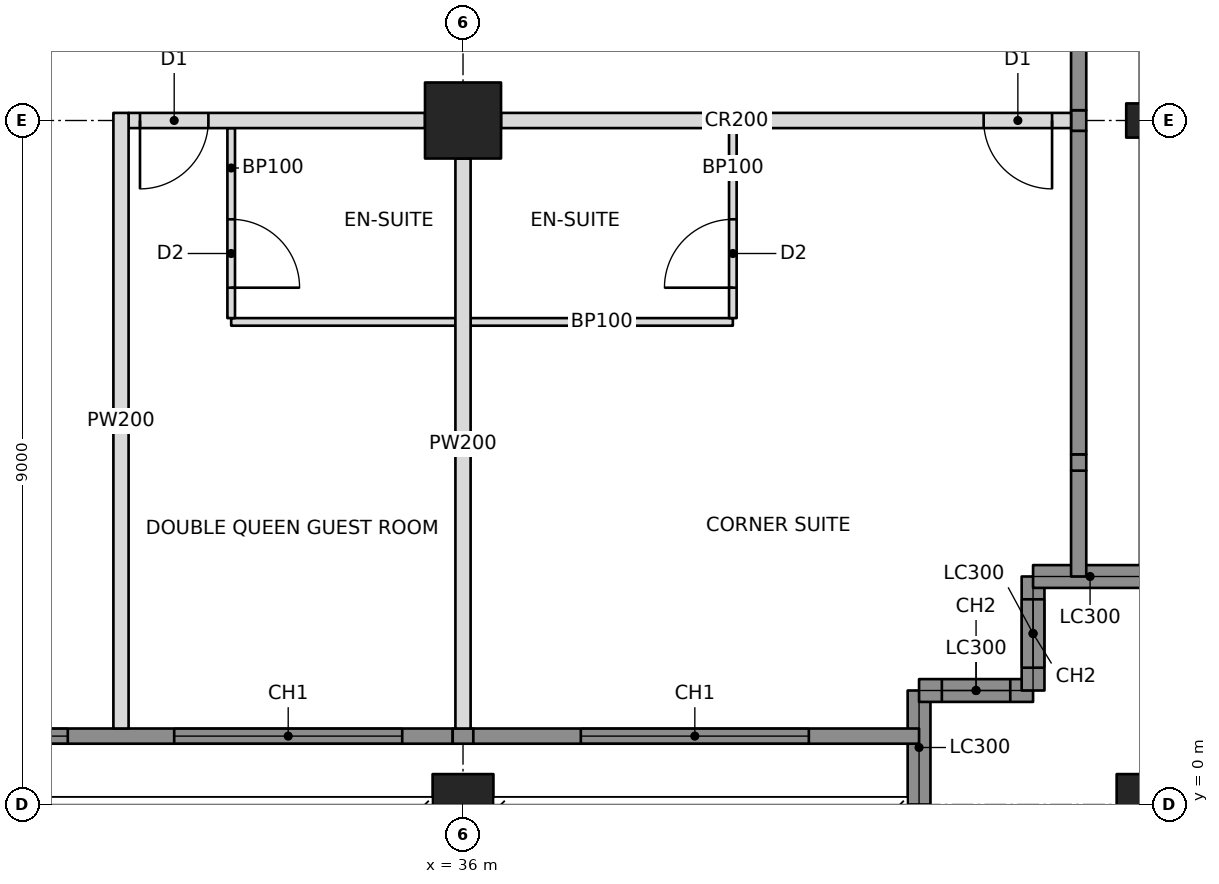
"""IFC4 building model, lengths in metres.
Left out: names, types, materials, properties, quantities, classifications, styles, units other than length and angle.
Written with IfcOpenShell. Run it as: python <this file> out.ifc"""

import sys

from ifc_helpers import new_model, si_unit, direction, frame, frame_2d, origin, origin_2d, place, context, subcontext, project, spatial, rectangle, hollow_rectangle, i_section, extrude, element, fill, save


model = new_model("IFC4")
c1 = context("Model", 3, precision=1e-05, world=origin(), true_north=direction((0.0, 1.0)))
c2 = subcontext(c1, "Body", "Model", "MODEL_VIEW")
j1 = project(units=[si_unit("LENGTHUNIT", "METRE"), si_unit("PLANEANGLEUNIT", "RADIAN")], contexts=[c1])
p1 = place(None, origin())
s1 = spatial("IfcSite", under=j1, at=p1, CompositionType="ELEMENT")
p2 = place(p1, origin())
s2 = spatial("IfcBuilding", under=s1, at=p2, CompositionType="ELEMENT")
p3 = place(p2, frame((0.0, 0.0, 97.6)))
s3 = spatial("IfcBuildingStorey", under=s2, at=p3, CompositionType="ELEMENT", Elevation=97.6)
p4 = place(p3, frame((36.0, 0.0, 0.0), z_axis=(0.0, 0.0, 1.0), x_axis=(1.0, 0.0, 0.0)))
e1 = element("IfcColumn", 1, at=p4, inside=s3, PredefinedType="COLUMN", context=c2, shape_type="SweptSolid", body=[
    extrude(hollow_rectangle(XDim=0.8, YDim=0.8, WallThickness=0.07, at=origin_2d()), origin(), (0.0, 0.0, 1.0), 3.4),
])
p5 = place(p3, frame((36.0, 9.0, 0.0), z_axis=(0.0, 0.0, 1.0), x_axis=(0.0, 1.0, 0.0)))
e2 = element("IfcColumn", 2, at=p5, inside=s3, PredefinedType="COLUMN", context=c2, shape_type="SweptSolid", body=[
    extrude(hollow_rectangle(XDim=1.0, YDim=1.0, WallThickness=0.1, at=origin_2d()), origin(), (0.0, 0.0, 1.0), 3.4),
])
p6 = place(p3, frame((45.0, 0.0, 0.0), z_axis=(0.0, 0.0, 1.0), x_axis=(1.0, 0.0, 0.0)))
e3 = element("IfcColumn", 3, at=p6, inside=s3, PredefinedType="COLUMN", context=c2, shape_type="SweptSolid", body=[
    extrude(hollow_rectangle(XDim=0.8, YDim=0.8, WallThickness=0.07, at=origin_2d()), origin(), (0.0, 0.0, 1.0), 3.4),
])
p7 = place(p3, frame((45.0, 9.0, 0.0), z_axis=(0.0, 0.0, 1.0), x_axis=(0.0, 1.0, 0.0)))
e4 = element("IfcColumn", 4, at=p7, inside=s3, PredefinedType="COLUMN", context=c2, shape_type="SweptSolid", body=[
    extrude(i_section(OverallWidth=0.449, OverallDepth=0.549, WebThickness=0.072, FlangeThickness=0.115, at=origin_2d()), origin(), (0.0, 0.0, 1.0), 3.4),
])
p8 = place(p3, frame((42.0, 0.0, 0.0), z_axis=(0.0, 0.0, 1.0), x_axis=(0.0, 1.0, 0.0)))
e5 = element("IfcWall", 5, at=p8, inside=s3, PredefinedType="SOLIDWALL", context=c2, shape_type="SweptSolid", body=[
    extrude(rectangle(XDim=1.5, YDim=0.3, at=frame_2d((0.75, 0.0))), origin(), (0.0, 0.0, 1.0), 2.42),
])
p9 = place(p3, frame((42.0, 1.5, 0.0), z_axis=(0.0, 0.0, 1.0), x_axis=(1.0, 0.0, 0.0)))
e6 = element("IfcWall", 6, at=p9, inside=s3, PredefinedType="SOLIDWALL", context=c2, shape_type="SweptSolid", body=[
    extrude(rectangle(XDim=1.5, YDim=0.3, at=frame_2d((0.75, 0.0))), origin(), (0.0, 0.0, 1.0), 3.2),
])
p10 = place(p9, frame((0.3, 0.0, 0.6)))
e7 = element("IfcOpeningElement", 7, at=p10, cuts=e6, PredefinedType="OPENING", context=c2, shape_type="SweptSolid", body=[
    extrude(rectangle(XDim=0.9, YDim=2.2, at=frame_2d((0.45, 1.1))), frame((0.0, 0.16, 0.0), z_axis=(0.0, -1.0, 0.0), x_axis=(1.0, 0.0, 0.0)), (0.0, 0.0, 1.0), 0.32),
])
p11 = place(p3, frame((43.5, 1.5, 0.0), z_axis=(0.0, 0.0, 1.0), x_axis=(0.0, 1.0, 0.0)))
e8 = element("IfcWall", 8, at=p11, inside=s3, PredefinedType="SOLIDWALL", context=c2, shape_type="SweptSolid", body=[
    extrude(rectangle(XDim=1.5, YDim=0.3, at=frame_2d((0.75, 0.0))), origin(), (0.0, 0.0, 1.0), 3.2),
])
p12 = place(p11, frame((0.3, 0.0, 0.6)))
e9 = element("IfcOpeningElement", 9, at=p12, cuts=e8, PredefinedType="OPENING", context=c2, shape_type="SweptSolid", body=[
    extrude(rectangle(XDim=0.9, YDim=2.2, at=frame_2d((0.45, 1.1))), frame((0.0, 0.16, 0.0), z_axis=(0.0, -1.0, 0.0), x_axis=(1.0, 0.0, 0.0)), (0.0, 0.0, 1.0), 0.32),
])
p13 = place(p3, frame((43.5, 3.0, 0.0), z_axis=(0.0, 0.0, 1.0), x_axis=(1.0, 0.0, 0.0)))
e10 = element("IfcWall", 10, at=p13, inside=s3, PredefinedType="SOLIDWALL", context=c2, shape_type="SweptSolid", body=[
    extrude(rectangle(XDim=1.5, YDim=0.3, at=frame_2d((0.75, 0.0))), origin(), (0.0, 0.0, 1.0), 2.42),
])
p14 = place(p3, frame((44.1, 3.0, 0.0), z_axis=(0.0, 0.0, 1.0), x_axis=(0.0, 1.0, 0.0)))
e11 = element("IfcWall", 11, at=p14, inside=s3, PredefinedType="SOLIDWALL", context=c2, shape_type="SweptSolid", body=[
    extrude(rectangle(XDim=1.393, YDim=0.2, at=frame_2d((0.696, 0.0))), origin(), (0.0, 0.0, 1.0), 3.2),
])
p15 = place(p3, frame((31.6, 9.0, 0.0), z_axis=(0.0, 0.0, 1.0), x_axis=(1.0, 0.0, 0.0)))
e12 = element("IfcWall", 12, at=p15, inside=s3, PredefinedType="PARTITIONING", context=c2, shape_type="SweptSolid", body=[
    extrude(rectangle(XDim=3.9, YDim=0.2, at=frame_2d((1.95, 0.0))), origin(), (0.0, 0.0, 1.0), 2.405),
])
p16 = place(p15, frame((0.15, 0.0, 0.0)))
e13 = element("IfcOpeningElement", 13, at=p16, cuts=e12, PredefinedType="OPENING", context=c2, shape_type="SweptSolid", body=[
    extrude(rectangle(XDim=0.9, YDim=2.1, at=frame_2d((0.45, 1.05))), frame((0.0, 0.11, 0.0), z_axis=(0.0, -1.0, 0.0), x_axis=(1.0, 0.0, 0.0)), (0.0, 0.0, 1.0), 0.22),
])
p17 = place(p3, frame((36.5, 9.0, 0.0), z_axis=(0.0, 0.0, 1.0), x_axis=(1.0, 0.0, 0.0)))
e14 = element("IfcWall", 14, at=p17, inside=s3, PredefinedType="PARTITIONING", context=c2, shape_type="SweptSolid", body=[
    extrude(rectangle(XDim=7.5, YDim=0.2, at=frame_2d((3.75, 0.0))), origin(), (0.0, 0.0, 1.0), 2.438),
])
p18 = place(p17, frame((6.35, 0.0, 0.0)))
e15 = element("IfcOpeningElement", 15, at=p18, cuts=e14, PredefinedType="OPENING", context=c2, shape_type="SweptSolid", body=[
    extrude(rectangle(XDim=0.9, YDim=2.1, at=frame_2d((0.45, 1.05))), frame((0.0, 0.11, 0.0), z_axis=(0.0, -1.0, 0.0), x_axis=(1.0, 0.0, 0.0)), (0.0, 0.0, 1.0), 0.22),
])
p19 = place(p3, frame((31.5, 9.1, 0.0), z_axis=(0.0, 0.0, 1.0), x_axis=(0.0, -1.0, 0.0)))
e16 = element("IfcWall", 16, at=p19, inside=s3, PredefinedType="PARTITIONING", context=c2, shape_type="SweptSolid", body=[
    extrude(rectangle(XDim=8.1, YDim=0.2, at=frame_2d((4.05, 0.0))), origin(), (0.0, 0.0, 1.0), 2.404),
])
p20 = place(p3, frame((36.0, 8.5, 0.0), z_axis=(0.0, 0.0, 1.0), x_axis=(0.0, -1.0, 0.0)))
e17 = element("IfcWall", 17, at=p20, inside=s3, PredefinedType="PARTITIONING", context=c2, shape_type="SweptSolid", body=[
    extrude(rectangle(XDim=7.5, YDim=0.2, at=frame_2d((3.75, 0.0))), origin(), (0.0, 0.0, 1.0), 2.438),
])
p21 = place(p3, frame((32.95, 6.35, 0.0), z_axis=(0.0, 0.0, 1.0), x_axis=(1.0, 0.0, 0.0)))
e18 = element("IfcWall", 18, at=p21, inside=s3, PredefinedType="PARTITIONING", context=c2, shape_type="SweptSolid", body=[
    extrude(rectangle(XDim=2.95, YDim=0.1, at=frame_2d((1.475, 0.0))), origin(), (0.0, 0.0, 1.0), 2.438),
])
p22 = place(p3, frame((32.95, 8.9, 0.0), z_axis=(0.0, 0.0, 1.0), x_axis=(0.0, -1.0, 0.0)))
e19 = element("IfcWall", 19, at=p22, inside=s3, PredefinedType="PARTITIONING", context=c2, shape_type="SweptSolid", body=[
    extrude(rectangle(XDim=2.5, YDim=0.1, at=frame_2d((1.25, 0.0))), origin(), (0.0, 0.0, 1.0), 2.404),
])
p23 = place(p22, frame((1.2, 0.0, 0.0)))
e20 = element("IfcOpeningElement", 20, at=p23, cuts=e19, PredefinedType="OPENING", context=c2, shape_type="SweptSolid", body=[
    extrude(rectangle(XDim=0.9, YDim=2.1, at=frame_2d((0.45, 1.05))), frame((0.0, 0.06, 0.0), z_axis=(0.0, -1.0, 0.0), x_axis=(1.0, 0.0, 0.0)), (0.0, 0.0, 1.0), 0.12),
])
p24 = place(p3, frame((36.1, 6.35, 0.0), z_axis=(0.0, 0.0, 1.0), x_axis=(1.0, 0.0, 0.0)))
e21 = element("IfcWall", 21, at=p24, inside=s3, PredefinedType="PARTITIONING", context=c2, shape_type="SweptSolid", body=[
    extrude(rectangle(XDim=3.45, YDim=0.1, at=frame_2d((1.725, 0.0))), origin(), (0.0, 0.0, 1.0), 2.438),
])
p25 = place(p3, frame((39.55, 8.9, 0.0), z_axis=(0.0, 0.0, 1.0), x_axis=(0.0, -1.0, 0.0)))
e22 = element("IfcWall", 22, at=p25, inside=s3, PredefinedType="PARTITIONING", context=c2, shape_type="SweptSolid", body=[
    extrude(rectangle(XDim=2.5, YDim=0.1, at=frame_2d((1.25, 0.0))), origin(), (0.0, 0.0, 1.0), 2.438),
])
p26 = place(p25, frame((1.2, 0.0, 0.0)))
e23 = element("IfcOpeningElement", 23, at=p26, cuts=e22, PredefinedType="OPENING", context=c2, shape_type="SweptSolid", body=[
    extrude(rectangle(XDim=0.9, YDim=2.1, at=frame_2d((0.45, 1.05))), frame((0.0, 0.06, 0.0), z_axis=(0.0, -1.0, 0.0), x_axis=(1.0, 0.0, 0.0)), (0.0, 0.0, 1.0), 0.12),
])
p27 = place(p3, frame((27.194, 0.9, 0.0), z_axis=(0.0, 0.0, 1.0), x_axis=(1.0, 0.0, 0.0)))
e24 = element("IfcWall", 24, at=p27, inside=s3, PredefinedType="SOLIDWALL", context=c2, shape_type="SweptSolid", body=[
    extrude(rectangle(XDim=8.671, YDim=0.2, at=frame_2d((4.335, 0.0))), origin(), (0.0, 0.0, 1.0), 3.2),
])
p28 = place(p27, frame((0.606, 0.0, 0.6)))
e25 = element("IfcOpeningElement", 25, at=p28, cuts=e24, PredefinedType="OPENING", context=c2, shape_type="SweptSolid", body=[
    extrude(rectangle(XDim=3.0, YDim=2.2, at=frame_2d((1.5, 1.1))), frame((0.0, 0.11, 0.0), z_axis=(0.0, -1.0, 0.0), x_axis=(1.0, 0.0, 0.0)), (0.0, 0.0, 1.0), 0.22),
])
p29 = place(p27, frame((5.006, 0.0, 0.6)))
e26 = element("IfcOpeningElement", 26, at=p29, cuts=e24, PredefinedType="OPENING", context=c2, shape_type="SweptSolid", body=[
    extrude(rectangle(XDim=3.0, YDim=2.2, at=frame_2d((1.5, 1.1))), frame((0.0, 0.11, 0.0), z_axis=(0.0, -1.0, 0.0), x_axis=(1.0, 0.0, 0.0)), (0.0, 0.0, 1.0), 0.22),
])
p30 = place(p3, frame((35.865, 0.9, 0.0), z_axis=(0.0, 0.0, 1.0), x_axis=(1.0, 0.0, 0.0)))
e27 = element("IfcWall", 27, at=p30, inside=s3, PredefinedType="SOLIDWALL", context=c2, shape_type="SweptSolid", body=[
    extrude(rectangle(XDim=0.271, YDim=0.2, at=frame_2d((0.135, 0.0))), origin(), (0.0, 0.0, 1.0), 2.438),
])
p31 = place(p3, frame((36.135, 0.9, 0.0), z_axis=(0.0, 0.0, 1.0), x_axis=(1.0, 0.0, 0.0)))
e28 = element("IfcWall", 28, at=p31, inside=s3, PredefinedType="SOLIDWALL", context=c2, shape_type="SweptSolid", body=[
    extrude(rectangle(XDim=5.865, YDim=0.2, at=frame_2d((2.932, 0.0))), origin(), (0.0, 0.0, 1.0), 3.2),
])
p32 = place(p31, frame((1.415, 0.0, 0.6)))
e29 = element("IfcOpeningElement", 29, at=p32, cuts=e28, PredefinedType="OPENING", context=c2, shape_type="SweptSolid", body=[
    extrude(rectangle(XDim=3.0, YDim=2.2, at=frame_2d((1.5, 1.1))), frame((0.0, 0.11, 0.0), z_axis=(0.0, -1.0, 0.0), x_axis=(1.0, 0.0, 0.0)), (0.0, 0.0, 1.0), 0.22),
])
p33 = place(p3, frame((44.1, 4.393, 0.0), z_axis=(0.0, 0.0, 1.0), x_axis=(0.0, 1.0, 0.0)))
e30 = element("IfcWall", 30, at=p33, inside=s3, PredefinedType="SOLIDWALL", context=c2, shape_type="SweptSolid", body=[
    extrude(rectangle(XDim=0.215, YDim=0.2, at=frame_2d((0.107, 0.0))), origin(), (0.0, 0.0, 1.0), 2.661),
])
p34 = place(p3, frame((44.1, 4.607, 0.0), z_axis=(0.0, 0.0, 1.0), x_axis=(0.0, 1.0, 0.0)))
e31 = element("IfcWall", 31, at=p34, inside=s3, PredefinedType="SOLIDWALL", context=c2, shape_type="SweptSolid", body=[
    extrude(rectangle(XDim=4.257, YDim=0.2, at=frame_2d((2.129, 0.0))), origin(), (0.0, 0.0, 1.0), 3.2),
])
p35 = place(p3, frame((44.1, 8.865, 0.0), z_axis=(0.0, 0.0, 1.0), x_axis=(0.0, 1.0, 0.0)))
e32 = element("IfcWall", 32, at=p35, inside=s3, PredefinedType="SOLIDWALL", context=c2, shape_type="SweptSolid", body=[
    extrude(rectangle(XDim=0.271, YDim=0.2, at=frame_2d((0.135, 0.0))), origin(), (0.0, 0.0, 1.0), 2.438),
])
p36 = place(p3, frame((44.1, 9.135, 0.0), z_axis=(0.0, 0.0, 1.0), x_axis=(0.0, 1.0, 0.0)))
e33 = element("IfcWall", 33, at=p36, inside=s3, PredefinedType="SOLIDWALL", context=c2, shape_type="SweptSolid", body=[
    extrude(rectangle(XDim=8.671, YDim=0.2, at=frame_2d((4.335, 0.0))), origin(), (0.0, 0.0, 1.0), 3.2),
])
p37 = place(p36, frame((2.015, 0.0, 0.6)))
e34 = element("IfcOpeningElement", 34, at=p37, cuts=e33, PredefinedType="OPENING", context=c2, shape_type="SweptSolid", body=[
    extrude(rectangle(XDim=3.0, YDim=2.2, at=frame_2d((1.5, 1.1))), frame((0.0, 0.11, 0.0), z_axis=(0.0, -1.0, 0.0), x_axis=(1.0, 0.0, 0.0)), (0.0, 0.0, 1.0), 0.22),
])
p38 = place(p36, frame((5.515, 0.0, 0.6)))
e35 = element("IfcOpeningElement", 35, at=p38, cuts=e33, PredefinedType="OPENING", context=c2, shape_type="SweptSolid", body=[
    extrude(rectangle(XDim=3.0, YDim=2.2, at=frame_2d((1.5, 1.1))), frame((0.0, 0.11, 0.0), z_axis=(0.0, -1.0, 0.0), x_axis=(1.0, 0.0, 0.0)), (0.0, 0.0, 1.0), 0.22),
])
p39 = place(p10, origin())
e36 = element("IfcWindow", 36, at=p39, inside=s3, PartitioningType="SINGLE_PANEL", PredefinedType="WINDOW", context=c2, shape_type="SweptSolid", body=[
    extrude(rectangle(XDim=0.9, YDim=2.2, at=frame_2d((0.45, 1.1))), frame((0.0, 0.03, 0.0), z_axis=(0.0, -1.0, 0.0), x_axis=(1.0, 0.0, 0.0)), (0.0, 0.0, 1.0), 0.06),
])
fill(e7, e36)
p40 = place(p12, origin())
e37 = element("IfcWindow", 37, at=p40, inside=s3, PartitioningType="SINGLE_PANEL", PredefinedType="WINDOW", context=c2, shape_type="SweptSolid", body=[
    extrude(rectangle(XDim=0.9, YDim=2.2, at=frame_2d((0.45, 1.1))), frame((0.0, 0.03, 0.0), z_axis=(0.0, -1.0, 0.0), x_axis=(1.0, 0.0, 0.0)), (0.0, 0.0, 1.0), 0.06),
])
fill(e9, e37)
p41 = place(p28, origin())
e38 = element("IfcWindow", 38, at=p41, inside=s3, PartitioningType="TRIPLE_PANEL_VERTICAL", PredefinedType="WINDOW", context=c2, shape_type="SweptSolid", body=[
    extrude(rectangle(XDim=3.0, YDim=2.2, at=frame_2d((1.5, 1.1))), frame((0.0, 0.03, 0.0), z_axis=(0.0, -1.0, 0.0), x_axis=(1.0, 0.0, 0.0)), (0.0, 0.0, 1.0), 0.06),
])
fill(e25, e38)
p42 = place(p29, origin())
e39 = element("IfcWindow", 39, at=p42, inside=s3, PartitioningType="TRIPLE_PANEL_VERTICAL", PredefinedType="WINDOW", context=c2, shape_type="SweptSolid", body=[
    extrude(rectangle(XDim=3.0, YDim=2.2, at=frame_2d((1.5, 1.1))), frame((0.0, 0.03, 0.0), z_axis=(0.0, -1.0, 0.0), x_axis=(1.0, 0.0, 0.0)), (0.0, 0.0, 1.0), 0.06),
])
fill(e26, e39)
p43 = place(p32, origin())
e40 = element("IfcWindow", 40, at=p43, inside=s3, PartitioningType="TRIPLE_PANEL_VERTICAL", PredefinedType="WINDOW", context=c2, shape_type="SweptSolid", body=[
    extrude(rectangle(XDim=3.0, YDim=2.2, at=frame_2d((1.5, 1.1))), frame((0.0, 0.03, 0.0), z_axis=(0.0, -1.0, 0.0), x_axis=(1.0, 0.0, 0.0)), (0.0, 0.0, 1.0), 0.06),
])
fill(e29, e40)
p44 = place(p23, origin())
e41 = element("IfcDoor", 41, at=p44, inside=s3, OperationType="SINGLE_SWING_RIGHT", PredefinedType="DOOR", context=c2, shape_type="SweptSolid", body=[
    extrude(rectangle(XDim=0.9, YDim=2.1, at=frame_2d((0.45, 1.05))), frame((0.0, 0.025, 0.0), z_axis=(0.0, -1.0, 0.0), x_axis=(1.0, 0.0, 0.0)), (0.0, 0.0, 1.0), 0.05),
])
fill(e20, e41)
p45 = place(p16, frame((0.9, 0.0, 0.0), z_axis=(0.0, 0.0, 1.0), x_axis=(-1.0, 0.0, 0.0)))
e42 = element("IfcDoor", 42, at=p45, inside=s3, OperationType="SINGLE_SWING_RIGHT", PredefinedType="DOOR", context=c2, shape_type="SweptSolid", body=[
    extrude(rectangle(XDim=0.9, YDim=2.1, at=frame_2d((0.45, 1.05))), frame((0.0, 0.025, 0.0), z_axis=(0.0, -1.0, 0.0), x_axis=(1.0, 0.0, 0.0)), (0.0, 0.0, 1.0), 0.05),
])
fill(e13, e42)
p46 = place(p26, frame((0.9, 0.0, 0.0), z_axis=(0.0, 0.0, 1.0), x_axis=(-1.0, 0.0, 0.0)))
e43 = element("IfcDoor", 43, at=p46, inside=s3, OperationType="SINGLE_SWING_LEFT", PredefinedType="DOOR", context=c2, shape_type="SweptSolid", body=[
    extrude(rectangle(XDim=0.9, YDim=2.1, at=frame_2d((0.45, 1.05))), frame((0.0, 0.025, 0.0), z_axis=(0.0, -1.0, 0.0), x_axis=(1.0, 0.0, 0.0)), (0.0, 0.0, 1.0), 0.05),
])
fill(e23, e43)
p47 = place(p18, frame((0.9, 0.0, 0.0), z_axis=(0.0, 0.0, 1.0), x_axis=(-1.0, 0.0, 0.0)))
e44 = element("IfcDoor", 44, at=p47, inside=s3, OperationType="SINGLE_SWING_LEFT", PredefinedType="DOOR", context=c2, shape_type="SweptSolid", body=[
    extrude(rectangle(XDim=0.9, YDim=2.1, at=frame_2d((0.45, 1.05))), frame((0.0, 0.025, 0.0), z_axis=(0.0, -1.0, 0.0), x_axis=(1.0, 0.0, 0.0)), (0.0, 0.0, 1.0), 0.05),
])
fill(e15, e44)
save(model, sys.argv[1])
